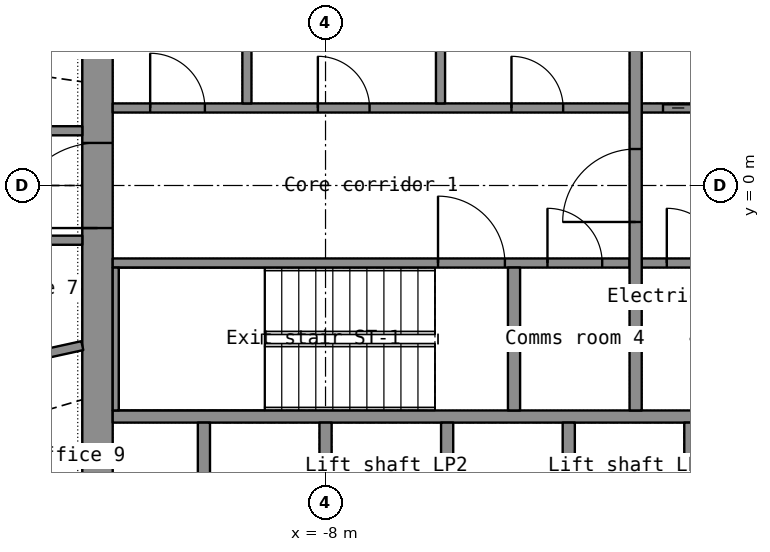
"""IFC4 building model, lengths in metres.
Left out: names, types, materials, properties, quantities, classifications, styles, units other than length and angle.
Written with IfcOpenShell. Run it as: python <this file> out.ifc"""

import sys

from ifc_helpers import new_model, si_unit, direction, frame, frame_2d, origin, place, context, subcontext, project, spatial, rectangle, extrude, element, fill, save


model = new_model("IFC4")
c1 = context("Model", 3, precision=1e-05, world=origin(), true_north=direction((0.0, 1.0)))
c2 = subcontext(c1, "Body", "Model", "MODEL_VIEW")
j1 = project(units=[si_unit("LENGTHUNIT", "METRE"), si_unit("PLANEANGLEUNIT", "RADIAN")], contexts=[c1])
p1 = place(None, origin())
s1 = spatial("IfcSite", under=j1, at=p1, CompositionType="ELEMENT")
p2 = place(p1, origin())
s2 = spatial("IfcBuilding", under=s1, at=p2, CompositionType="ELEMENT")
p3 = place(p2, frame((0.0, 0.0, 115.6)))
s3 = spatial("IfcBuildingStorey", under=s2, at=p3, CompositionType="ELEMENT", Elevation=115.6)
p4 = place(p3, frame((-11.75, -7.2, 0.0), z_axis=(0.0, 0.0, 1.0), x_axis=(0.0, 1.0, 0.0)))
e1 = element("IfcWall", 1, at=p4, inside=s3, PredefinedType="SHEAR", context=c2, shape_type="SweptSolid", body=[
    extrude(rectangle(XDim=14.4, YDim=0.5, at=frame_2d((7.2, 0.0))), origin(), (0.0, 0.0, 1.0), 3.3),
])
p5 = place(p4, frame((6.5, 0.0, 0.0)))
e2 = element("IfcOpeningElement", 2, at=p5, cuts=e1, PredefinedType="OPENING", context=c2, shape_type="SweptSolid", body=[
    extrude(rectangle(XDim=1.4, YDim=2.2, at=frame_2d((0.7, 1.1))), frame((0.0, 0.26, 0.0), z_axis=(0.0, -1.0, 0.0), x_axis=(1.0, 0.0, 0.0)), (0.0, 0.0, 1.0), 0.52),
])
p6 = place(p3, frame((-11.5, -3.8, 0.0), z_axis=(0.0, 0.0, 1.0), x_axis=(1.0, 0.0, 0.0)))
e3 = element("IfcWall", 3, at=p6, inside=s3, PredefinedType="SHEAR", context=c2, shape_type="SweptSolid", body=[
    extrude(rectangle(XDim=23.0, YDim=0.2, at=frame_2d((11.5, 0.0))), origin(), (0.0, 0.0, 1.0), 3.3),
])
for number, where, z_axis, x_axis in (
    (4, (-10.0, -6.7, 0.0), (0.0, 0.0, 1.0), (0.0, 1.0, 0.0)),
    (5, (-8.0, -6.7, 0.0), (0.0, 0.0, 1.0), (0.0, 1.0, 0.0)),
    (6, (-6.0, -6.7, 0.0), (0.0, 0.0, 1.0), (0.0, 1.0, 0.0)),
    (7, (-4.0, -6.7, 0.0), (0.0, 0.0, 1.0), (0.0, 1.0, 0.0)),
    (8, (-2.0, -6.7, 0.0), (0.0, 0.0, 1.0), (0.0, 1.0, 0.0)),
):
    element("IfcWall", number, at=place(p3, frame(where, z_axis=z_axis, x_axis=x_axis)), inside=s3, PredefinedType="SHEAR", context=c2, shape_type="SweptSolid", body=[
        extrude(rectangle(XDim=2.8, YDim=0.2, at=frame_2d((1.4, 0.0))), origin(), (0.0, 0.0, 1.0), 3.3),
    ])
p7 = place(p3, frame((-11.5, -1.275, 0.0), z_axis=(0.0, 0.0, 1.0), x_axis=(1.0, 0.0, 0.0)))
e9 = element("IfcWall", 9, at=p7, inside=s3, PredefinedType="SHEAR", context=c2, shape_type="SweptSolid", body=[
    extrude(rectangle(XDim=8.5, YDim=0.15, at=frame_2d((4.25, 0.0))), origin(), (0.0, 0.0, 1.0), 3.3),
])
p8 = place(p7, frame((5.35, 0.0, 0.0)))
e10 = element("IfcOpeningElement", 10, at=p8, cuts=e9, PredefinedType="OPENING", context=c2, shape_type="SweptSolid", body=[
    extrude(rectangle(XDim=1.1, YDim=2.15, at=frame_2d((0.55, 1.075))), frame((0.0, 0.085, 0.0), z_axis=(0.0, -1.0, 0.0), x_axis=(1.0, 0.0, 0.0)), (0.0, 0.0, 1.0), 0.17),
])
p9 = place(p7, frame((7.15, 0.0, 0.0)))
e11 = element("IfcOpeningElement", 11, at=p9, cuts=e9, PredefinedType="OPENING", context=c2, shape_type="SweptSolid", body=[
    extrude(rectangle(XDim=0.9, YDim=2.1, at=frame_2d((0.45, 1.05))), frame((0.0, 0.085, 0.0), z_axis=(0.0, -1.0, 0.0), x_axis=(1.0, 0.0, 0.0)), (0.0, 0.0, 1.0), 0.17),
])
p10 = place(p3, frame((-2.8, -1.275, 0.0), z_axis=(0.0, 0.0, 1.0), x_axis=(1.0, 0.0, 0.0)))
e12 = element("IfcWall", 12, at=p10, inside=s3, PredefinedType="SHEAR", context=c2, shape_type="SweptSolid", body=[
    extrude(rectangle(XDim=5.6, YDim=0.15, at=frame_2d((2.8, 0.0))), origin(), (0.0, 0.0, 1.0), 3.3),
])
p11 = place(p10, frame((4.15, 0.0, 0.0)))
e13 = element("IfcOpeningElement", 13, at=p11, cuts=e12, PredefinedType="OPENING", context=c2, shape_type="SweptSolid", body=[
    extrude(rectangle(XDim=1.1, YDim=2.2, at=frame_2d((0.55, 1.1))), frame((0.0, 0.085, 0.0), z_axis=(0.0, -1.0, 0.0), x_axis=(1.0, 0.0, 0.0)), (0.0, 0.0, 1.0), 0.17),
])
p12 = place(p10, frame((0.413, 0.0, 0.0)))
e14 = element("IfcOpeningElement", 14, at=p12, cuts=e12, PredefinedType="OPENING", context=c2, shape_type="SweptSolid", body=[
    extrude(rectangle(XDim=0.9, YDim=2.1, at=frame_2d((0.45, 1.05))), frame((0.0, 0.085, 0.0), z_axis=(0.0, -1.0, 0.0), x_axis=(1.0, 0.0, 0.0)), (0.0, 0.0, 1.0), 0.17),
])
p13 = place(p10, frame((2.288, 0.0, 0.0)))
e15 = element("IfcOpeningElement", 15, at=p13, cuts=e12, PredefinedType="OPENING", context=c2, shape_type="SweptSolid", body=[
    extrude(rectangle(XDim=0.9, YDim=2.1, at=frame_2d((0.45, 1.05))), frame((0.0, 0.085, 0.0), z_axis=(0.0, -1.0, 0.0), x_axis=(1.0, 0.0, 0.0)), (0.0, 0.0, 1.0), 0.17),
])
p14 = place(p3, frame((-11.5, 1.275, 0.0), z_axis=(0.0, 0.0, 1.0), x_axis=(1.0, 0.0, 0.0)))
e16 = element("IfcWall", 16, at=p14, inside=s3, PredefinedType="PARTITIONING", context=c2, shape_type="SweptSolid", body=[
    extrude(rectangle(XDim=8.5, YDim=0.15, at=frame_2d((4.25, 0.0))), origin(), (0.0, 0.0, 1.0), 3.3),
])
p15 = place(p14, frame((0.616, 0.0, 0.0)))
e17 = element("IfcOpeningElement", 17, at=p15, cuts=e16, PredefinedType="OPENING", context=c2, shape_type="SweptSolid", body=[
    extrude(rectangle(XDim=0.9, YDim=2.1, at=frame_2d((0.45, 1.05))), frame((0.0, 0.085, 0.0), z_axis=(0.0, -1.0, 0.0), x_axis=(1.0, 0.0, 0.0)), (0.0, 0.0, 1.0), 0.17),
])
p16 = place(p14, frame((3.374, 0.0, 0.0)))
e18 = element("IfcOpeningElement", 18, at=p16, cuts=e16, PredefinedType="OPENING", context=c2, shape_type="SweptSolid", body=[
    extrude(rectangle(XDim=0.85, YDim=2.1, at=frame_2d((0.425, 1.05))), frame((0.0, 0.085, 0.0), z_axis=(0.0, -1.0, 0.0), x_axis=(1.0, 0.0, 0.0)), (0.0, 0.0, 1.0), 0.17),
])
p17 = place(p14, frame((6.558, 0.0, 0.0)))
e19 = element("IfcOpeningElement", 19, at=p17, cuts=e16, PredefinedType="OPENING", context=c2, shape_type="SweptSolid", body=[
    extrude(rectangle(XDim=0.85, YDim=2.1, at=frame_2d((0.425, 1.05))), frame((0.0, 0.085, 0.0), z_axis=(0.0, -1.0, 0.0), x_axis=(1.0, 0.0, 0.0)), (0.0, 0.0, 1.0), 0.17),
])
p18 = place(p3, frame((-2.8, 1.275, 0.0), z_axis=(0.0, 0.0, 1.0), x_axis=(1.0, 0.0, 0.0)))
e20 = element("IfcWall", 20, at=p18, inside=s3, PredefinedType="SHEAR", context=c2, shape_type="SweptSolid", body=[
    extrude(rectangle(XDim=5.6, YDim=0.15, at=frame_2d((2.8, 0.0))), origin(), (0.0, 0.0, 1.0), 3.3),
])
p19 = place(p18, frame((0.35, 0.0, 0.0)))
e21 = element("IfcOpeningElement", 21, at=p19, cuts=e20, PredefinedType="OPENING", context=c2, shape_type="SweptSolid", body=[
    extrude(rectangle(XDim=1.1, YDim=2.2, at=frame_2d((0.55, 1.1))), frame((0.0, 0.085, 0.0), z_axis=(0.0, -1.0, 0.0), x_axis=(1.0, 0.0, 0.0)), (0.0, 0.0, 1.0), 0.17),
])
p20 = place(p18, frame((3.35, 0.0, 0.0)))
e22 = element("IfcOpeningElement", 22, at=p20, cuts=e20, PredefinedType="OPENING", context=c2, shape_type="SweptSolid", body=[
    extrude(rectangle(XDim=0.9, YDim=2.1, at=frame_2d((0.45, 1.05))), frame((0.0, 0.085, 0.0), z_axis=(0.0, -1.0, 0.0), x_axis=(1.0, 0.0, 0.0)), (0.0, 0.0, 1.0), 0.17),
])
p21 = place(p3, frame((-2.9, -3.7, 0.0), z_axis=(0.0, 0.0, 1.0), x_axis=(0.0, 1.0, 0.0)))
e23 = element("IfcWall", 23, at=p21, inside=s3, PredefinedType="SHEAR", context=c2, shape_type="SweptSolid", body=[
    extrude(rectangle(XDim=7.4, YDim=0.2, at=frame_2d((3.7, 0.0))), origin(), (0.0, 0.0, 1.0), 3.3),
])
p22 = place(p21, frame((3.1, 0.0, 0.0)))
e24 = element("IfcOpeningElement", 24, at=p22, cuts=e23, PredefinedType="OPENING", context=c2, shape_type="SweptSolid", body=[
    extrude(rectangle(XDim=1.2, YDim=2.2, at=frame_2d((0.6, 1.1))), frame((0.0, 0.11, 0.0), z_axis=(0.0, -1.0, 0.0), x_axis=(1.0, 0.0, 0.0)), (0.0, 0.0, 1.0), 0.22),
])
p23 = place(p3, frame((-11.45, -3.7, 0.0), z_axis=(0.0, 0.0, 1.0), x_axis=(0.0, 1.0, 0.0)))
e25 = element("IfcWall", 25, at=p23, inside=s3, PredefinedType="SHEAR", context=c2, shape_type="SweptSolid", body=[
    extrude(rectangle(XDim=2.35, YDim=0.1, at=frame_2d((1.175, 0.0))), origin(), (0.0, 0.0, 1.0), 3.3),
])
p24 = place(p3, frame((-4.9, -3.7, 0.0), z_axis=(0.0, 0.0, 1.0), x_axis=(0.0, 1.0, 0.0)))
e26 = element("IfcWall", 26, at=p24, inside=s3, PredefinedType="SHEAR", context=c2, shape_type="SweptSolid", body=[
    extrude(rectangle(XDim=2.35, YDim=0.2, at=frame_2d((1.175, 0.0))), origin(), (0.0, 0.0, 1.0), 3.3),
])
for number, where, z_axis, x_axis in (
    (27, (-9.293, 1.35, 0.0), (0.0, 0.0, 1.0), (0.0, 1.0, 0.0)),
    (28, (-6.109, 1.35, 0.0), (0.0, 0.0, 1.0), (0.0, 1.0, 0.0)),
):
    element("IfcWall", number, at=place(p3, frame(where, z_axis=z_axis, x_axis=x_axis)), inside=s3, PredefinedType="PARTITIONING", context=c2, shape_type="SweptSolid", body=[
        extrude(rectangle(XDim=2.35, YDim=0.15, at=frame_2d((1.175, 0.0))), origin(), (0.0, 0.0, 1.0), 3.3),
    ])
p25 = place(p3, frame((-16.0, -3.512, 0.0), z_axis=(0.0, 0.0, 1.0), x_axis=(0.976750433, 0.214379551, 0.0)))
e29 = element("IfcWall", 29, at=p25, inside=s3, PredefinedType="PARTITIONING", context=c2, shape_type="SweptSolid", body=[
    extrude(rectangle(XDim=4.095, YDim=0.15, at=frame_2d((2.048, 0.0))), origin(), (0.0, 0.0, 1.0), 2.4),
])
p26 = place(p3, frame((-16.0, -0.9, 0.0), z_axis=(0.0, 0.0, 1.0), x_axis=(1.0, 0.0, 0.0)))
e30 = element("IfcWall", 30, at=p26, inside=s3, PredefinedType="PARTITIONING", context=c2, shape_type="SweptSolid", body=[
    extrude(rectangle(XDim=4.0, YDim=0.15, at=frame_2d((2.0, 0.0))), origin(), (0.0, 0.0, 1.0), 2.4),
])
p27 = place(p26, frame((1.4, 0.0, 0.0)))
e31 = element("IfcOpeningElement", 31, at=p27, cuts=e30, PredefinedType="OPENING", context=c2, shape_type="SweptSolid", body=[
    extrude(rectangle(XDim=1.2, YDim=2.2, at=frame_2d((0.6, 1.1))), frame((0.0, 0.085, 0.0), z_axis=(0.0, -1.0, 0.0), x_axis=(1.0, 0.0, 0.0)), (0.0, 0.0, 1.0), 0.17),
])
p28 = place(p3, frame((-12.0, 0.9, 0.0), z_axis=(0.0, 0.0, 1.0), x_axis=(-1.0, 0.0, 0.0)))
e32 = element("IfcWall", 32, at=p28, inside=s3, PredefinedType="PARTITIONING", context=c2, shape_type="SweptSolid", body=[
    extrude(rectangle(XDim=3.923, YDim=0.15, at=frame_2d((1.961, 0.0))), origin(), (0.0, 0.0, 1.0), 2.4),
])
p29 = place(p5, origin())
e33 = element("IfcDoor", 33, at=p29, inside=s3, OperationType="DOUBLE_DOOR_SINGLE_SWING", PredefinedType="DOOR", context=c2, shape_type="SweptSolid", body=[
    extrude(rectangle(XDim=1.4, YDim=2.2, at=frame_2d((0.7, 1.1))), frame((0.0, 0.025, 0.0), z_axis=(0.0, -1.0, 0.0), x_axis=(1.0, 0.0, 0.0)), (0.0, 0.0, 1.0), 0.05),
])
fill(e2, e33)
p30 = place(p22, origin())
e34 = element("IfcDoor", 34, at=p30, inside=s3, OperationType="SINGLE_SWING_LEFT", PredefinedType="DOOR", context=c2, shape_type="SweptSolid", body=[
    extrude(rectangle(XDim=1.2, YDim=2.2, at=frame_2d((0.6, 1.1))), frame((0.0, 0.025, 0.0), z_axis=(0.0, -1.0, 0.0), x_axis=(1.0, 0.0, 0.0)), (0.0, 0.0, 1.0), 0.05),
])
fill(e24, e34)
p31 = place(p19, origin())
e35 = element("IfcDoor", 35, at=p31, inside=s3, OperationType="DOUBLE_DOOR_SLIDING", PredefinedType="DOOR", context=c2, shape_type="SweptSolid", body=[
    extrude(rectangle(XDim=1.1, YDim=2.2, at=frame_2d((0.55, 1.1))), frame((0.0, 0.025, 0.0), z_axis=(0.0, -1.0, 0.0), x_axis=(1.0, 0.0, 0.0)), (0.0, 0.0, 1.0), 0.05),
])
fill(e21, e35)
p32 = place(p8, origin())
e36 = element("IfcDoor", 36, at=p32, inside=s3, OperationType="SINGLE_SWING_LEFT", PredefinedType="DOOR", context=c2, shape_type="SweptSolid", body=[
    extrude(rectangle(XDim=1.1, YDim=2.15, at=frame_2d((0.55, 1.075))), frame((0.0, 0.025, 0.0), z_axis=(0.0, -1.0, 0.0), x_axis=(1.0, 0.0, 0.0)), (0.0, 0.0, 1.0), 0.05),
])
fill(e10, e36)
p33 = place(p15, origin())
e37 = element("IfcDoor", 37, at=p33, inside=s3, OperationType="SINGLE_SWING_LEFT", PredefinedType="DOOR", context=c2, shape_type="SweptSolid", body=[
    extrude(rectangle(XDim=0.9, YDim=2.1, at=frame_2d((0.45, 1.05))), frame((0.0, 0.025, 0.0), z_axis=(0.0, -1.0, 0.0), x_axis=(1.0, 0.0, 0.0)), (0.0, 0.0, 1.0), 0.05),
])
fill(e17, e37)
p34 = place(p16, origin())
e38 = element("IfcDoor", 38, at=p34, inside=s3, OperationType="SINGLE_SWING_LEFT", PredefinedType="DOOR", context=c2, shape_type="SweptSolid", body=[
    extrude(rectangle(XDim=0.85, YDim=2.1, at=frame_2d((0.425, 1.05))), frame((0.0, 0.025, 0.0), z_axis=(0.0, -1.0, 0.0), x_axis=(1.0, 0.0, 0.0)), (0.0, 0.0, 1.0), 0.05),
])
fill(e18, e38)
p35 = place(p17, origin())
e39 = element("IfcDoor", 39, at=p35, inside=s3, OperationType="SINGLE_SWING_LEFT", PredefinedType="DOOR", context=c2, shape_type="SweptSolid", body=[
    extrude(rectangle(XDim=0.85, YDim=2.1, at=frame_2d((0.425, 1.05))), frame((0.0, 0.025, 0.0), z_axis=(0.0, -1.0, 0.0), x_axis=(1.0, 0.0, 0.0)), (0.0, 0.0, 1.0), 0.05),
])
fill(e19, e39)
p36 = place(p12, origin())
e40 = element("IfcDoor", 40, at=p36, inside=s3, OperationType="SINGLE_SWING_LEFT", PredefinedType="DOOR", context=c2, shape_type="SweptSolid", body=[
    extrude(rectangle(XDim=0.9, YDim=2.1, at=frame_2d((0.45, 1.05))), frame((0.0, 0.025, 0.0), z_axis=(0.0, -1.0, 0.0), x_axis=(1.0, 0.0, 0.0)), (0.0, 0.0, 1.0), 0.05),
])
fill(e14, e40)
p37 = place(p9, origin())
e41 = element("IfcDoor", 41, at=p37, inside=s3, OperationType="SINGLE_SWING_LEFT", PredefinedType="DOOR", context=c2, shape_type="SweptSolid", body=[
    extrude(rectangle(XDim=0.9, YDim=2.1, at=frame_2d((0.45, 1.05))), frame((0.0, 0.025, 0.0), z_axis=(0.0, -1.0, 0.0), x_axis=(1.0, 0.0, 0.0)), (0.0, 0.0, 1.0), 0.05),
])
fill(e11, e41)
save(model, sys.argv[1])
